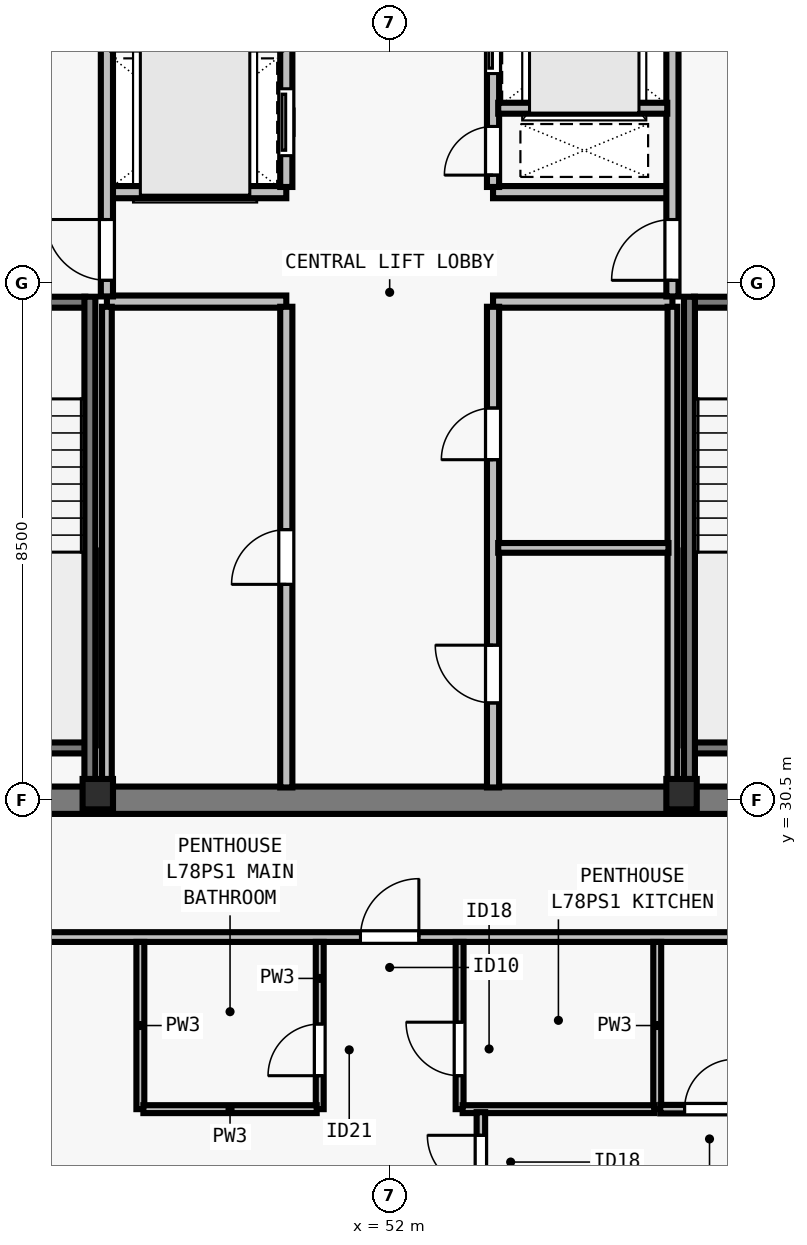
"""IFC4 building model, lengths in metres.
Left out: names, types, materials, properties, quantities, classifications, styles, units other than length and angle.
Written with IfcOpenShell. Run it as: python <this file> out.ifc"""

import sys

from ifc_helpers import new_model, si_unit, direction, frame, frame_2d, origin, origin_2d, place, context, subcontext, project, spatial, rectangle, i_section, extrude, element, fill, save


model = new_model("IFC4")
c1 = context("Model", 3, precision=1e-05, world=origin(), true_north=direction((0.0, 1.0)))
c2 = subcontext(c1, "Body", "Model", "MODEL_VIEW")
j1 = project(units=[si_unit("LENGTHUNIT", "METRE"), si_unit("PLANEANGLEUNIT", "RADIAN")], contexts=[c1])
p1 = place(None, origin())
s1 = spatial("IfcSite", under=j1, at=p1, CompositionType="ELEMENT")
p2 = place(p1, origin())
s2 = spatial("IfcBuilding", under=s1, at=p2, CompositionType="ELEMENT")
p3 = place(p2, frame((0.0, 0.0, 284.0)))
s3 = spatial("IfcBuildingStorey", under=s2, at=p3, CompositionType="ELEMENT", Elevation=284.0)
for number, where, z_axis, x_axis in (
    (1, (47.2, 30.6, 0.0), (0.0, 0.0, 1.0), (1.0, 0.0, 0.0)),
    (2, (56.8, 30.6, 0.0), (0.0, 0.0, 1.0), (1.0, 0.0, 0.0)),
):
    element("IfcColumn", number, at=place(p3, frame(where, z_axis=z_axis, x_axis=x_axis)), inside=s3, PredefinedType="COLUMN", context=c2, shape_type="SweptSolid", body=[
        extrude(i_section(OverallWidth=0.5, OverallDepth=0.5, WebThickness=0.028, FlangeThickness=0.045, at=origin_2d()), origin(), (0.0, 0.0, 1.0), 3.5),
    ])
p4 = place(p3, frame((43.275, 30.5, 0.0), z_axis=(0.0, 0.0, 1.0), x_axis=(1.0, 0.0, 0.0)))
e3 = element("IfcWall", 3, at=p4, inside=s3, PredefinedType="SHEAR", context=c2, shape_type="SweptSolid", body=[
    extrude(rectangle(XDim=17.45, YDim=0.45, at=frame_2d((8.725, 0.0))), origin(), (0.0, 0.0, 1.0), 3.29),
])
for number, where, z_axis, x_axis in (
    (4, (47.35, 38.7, 0.0), (0.0, 0.0, 1.0), (1.0, 0.0, 0.0)),
    (5, (47.35, 40.5, 0.0), (0.0, 0.0, 1.0), (1.0, 0.0, 0.0)),
    (6, (53.7, 38.7, 0.0), (0.0, 0.0, 1.0), (1.0, 0.0, 0.0)),
    (7, (53.7, 40.5, 0.0), (0.0, 0.0, 1.0), (1.0, 0.0, 0.0)),
):
    element("IfcWall", number, at=place(p3, frame(where, z_axis=z_axis, x_axis=x_axis)), inside=s3, PredefinedType="SOLIDWALL", context=c2, shape_type="SweptSolid", body=[
        extrude(rectangle(XDim=2.95, YDim=0.2, at=frame_2d((1.475, 0.0))), origin(), (0.0, 0.0, 1.0), 3.29),
    ])
p5 = place(p3, frame((50.3, 30.71, 0.0), z_axis=(0.0, 0.0, 1.0), x_axis=(0.0, 1.0, 0.0)))
e8 = element("IfcWall", 8, at=p5, inside=s3, PredefinedType="SOLIDWALL", context=c2, shape_type="SweptSolid", body=[
    extrude(rectangle(XDim=7.905, YDim=0.2, at=frame_2d((3.953, 0.0))), origin(), (0.0, 0.0, 1.0), 3.29),
])
p6 = place(p5, frame((3.34, 0.0, 0.0)))
e9 = element("IfcOpeningElement", 9, at=p6, cuts=e8, PredefinedType="OPENING", context=c2, shape_type="SweptSolid", body=[
    extrude(rectangle(XDim=0.9, YDim=2.12, at=frame_2d((0.45, 1.06))), frame((0.0, 0.11, 0.0), z_axis=(0.0, -1.0, 0.0), x_axis=(1.0, 0.0, 0.0)), (0.0, 0.0, 1.0), 0.22),
])
p7 = place(p3, frame((53.7, 30.71, 0.0), z_axis=(0.0, 0.0, 1.0), x_axis=(0.0, 1.0, 0.0)))
e10 = element("IfcWall", 10, at=p7, inside=s3, PredefinedType="SOLIDWALL", context=c2, shape_type="SweptSolid", body=[
    extrude(rectangle(XDim=7.905, YDim=0.2, at=frame_2d((3.953, 0.0))), origin(), (0.0, 0.0, 1.0), 3.29),
])
p8 = place(p7, frame((1.39, 0.0, 0.0)))
e11 = element("IfcOpeningElement", 11, at=p8, cuts=e10, PredefinedType="OPENING", context=c2, shape_type="SweptSolid", body=[
    extrude(rectangle(XDim=0.95, YDim=2.12, at=frame_2d((0.475, 1.06))), frame((0.0, 0.11, 0.0), z_axis=(0.0, -1.0, 0.0), x_axis=(1.0, 0.0, 0.0)), (0.0, 0.0, 1.0), 0.22),
])
p9 = place(p7, frame((5.39, 0.0, 0.0)))
e12 = element("IfcOpeningElement", 12, at=p9, cuts=e10, PredefinedType="OPENING", context=c2, shape_type="SweptSolid", body=[
    extrude(rectangle(XDim=0.85, YDim=2.12, at=frame_2d((0.425, 1.06))), frame((0.0, 0.11, 0.0), z_axis=(0.0, -1.0, 0.0), x_axis=(1.0, 0.0, 0.0)), (0.0, 0.0, 1.0), 0.22),
])
p10 = place(p3, frame((50.3, 40.585, 0.0), z_axis=(0.0, 0.0, 1.0), x_axis=(0.0, 1.0, 0.0)))
e13 = element("IfcWall", 13, at=p10, inside=s3, PredefinedType="SOLIDWALL", context=c2, shape_type="SweptSolid", body=[
    extrude(rectangle(XDim=6.705, YDim=0.2, at=frame_2d((3.353, 0.0))), origin(), (0.0, 0.0, 1.0), 3.29),
])
p11 = place(p10, frame((0.515, 0.0, 0.0)))
e14 = element("IfcOpeningElement", 14, at=p11, cuts=e13, PredefinedType="OPENING", context=c2, shape_type="SweptSolid", body=[
    extrude(rectangle(XDim=1.1, YDim=2.2, at=frame_2d((0.55, 1.1))), frame((0.0, 0.11, 0.0), z_axis=(0.0, -1.0, 0.0), x_axis=(1.0, 0.0, 0.0)), (0.0, 0.0, 1.0), 0.22),
])
p12 = place(p10, frame((3.015, 0.0, 0.0)))
e15 = element("IfcOpeningElement", 15, at=p12, cuts=e13, PredefinedType="OPENING", context=c2, shape_type="SweptSolid", body=[
    extrude(rectangle(XDim=1.1, YDim=2.2, at=frame_2d((0.55, 1.1))), frame((0.0, 0.11, 0.0), z_axis=(0.0, -1.0, 0.0), x_axis=(1.0, 0.0, 0.0)), (0.0, 0.0, 1.0), 0.22),
])
p13 = place(p10, frame((5.065, 0.0, 0.0)))
e16 = element("IfcOpeningElement", 16, at=p13, cuts=e13, PredefinedType="OPENING", context=c2, shape_type="SweptSolid", body=[
    extrude(rectangle(XDim=0.8, YDim=2.08, at=frame_2d((0.4, 1.04))), frame((0.0, 0.11, 0.0), z_axis=(0.0, -1.0, 0.0), x_axis=(1.0, 0.0, 0.0)), (0.0, 0.0, 1.0), 0.22),
])
p14 = place(p3, frame((53.7, 40.585, 0.0), z_axis=(0.0, 0.0, 1.0), x_axis=(0.0, 1.0, 0.0)))
e17 = element("IfcWall", 17, at=p14, inside=s3, PredefinedType="SOLIDWALL", context=c2, shape_type="SweptSolid", body=[
    extrude(rectangle(XDim=6.705, YDim=0.2, at=frame_2d((3.353, 0.0))), origin(), (0.0, 0.0, 1.0), 3.29),
])
p15 = place(p14, frame((0.195, 0.0, 0.0)))
e18 = element("IfcOpeningElement", 18, at=p15, cuts=e17, PredefinedType="OPENING", context=c2, shape_type="SweptSolid", body=[
    extrude(rectangle(XDim=0.8, YDim=2.08, at=frame_2d((0.4, 1.04))), frame((0.0, 0.11, 0.0), z_axis=(0.0, -1.0, 0.0), x_axis=(1.0, 0.0, 0.0)), (0.0, 0.0, 1.0), 0.22),
])
p16 = place(p14, frame((1.865, 0.0, 0.0)))
e19 = element("IfcOpeningElement", 19, at=p16, cuts=e17, PredefinedType="OPENING", context=c2, shape_type="SweptSolid", body=[
    extrude(rectangle(XDim=1.1, YDim=2.2, at=frame_2d((0.55, 1.1))), frame((0.0, 0.11, 0.0), z_axis=(0.0, -1.0, 0.0), x_axis=(1.0, 0.0, 0.0)), (0.0, 0.0, 1.0), 0.22),
])
p17 = place(p14, frame((4.265, 0.0, 0.0)))
e20 = element("IfcOpeningElement", 20, at=p17, cuts=e17, PredefinedType="OPENING", context=c2, shape_type="SweptSolid", body=[
    extrude(rectangle(XDim=0.95, YDim=2.12, at=frame_2d((0.475, 1.06))), frame((0.0, 0.11, 0.0), z_axis=(0.0, -1.0, 0.0), x_axis=(1.0, 0.0, 0.0)), (0.0, 0.0, 1.0), 0.22),
])
p18 = place(p3, frame((47.35, 38.785, 0.0), z_axis=(0.0, 0.0, 1.0), x_axis=(0.0, 1.0, 0.0)))
e21 = element("IfcWall", 21, at=p18, inside=s3, PredefinedType="SOLIDWALL", context=c2, shape_type="SweptSolid", body=[
    extrude(rectangle(XDim=4.865, YDim=0.2, at=frame_2d((2.433, 0.0))), origin(), (0.0, 0.0, 1.0), 3.29),
])
p19 = place(p18, frame((0.265, 0.0, 0.0)))
e22 = element("IfcOpeningElement", 22, at=p19, cuts=e21, PredefinedType="OPENING", context=c2, shape_type="SweptSolid", body=[
    extrude(rectangle(XDim=1.0, YDim=2.15, at=frame_2d((0.5, 1.075))), frame((0.0, 0.11, 0.0), z_axis=(0.0, -1.0, 0.0), x_axis=(1.0, 0.0, 0.0)), (0.0, 0.0, 1.0), 0.22),
])
p20 = place(p3, frame((56.65, 38.785, 0.0), z_axis=(0.0, 0.0, 1.0), x_axis=(0.0, 1.0, 0.0)))
e23 = element("IfcWall", 23, at=p20, inside=s3, PredefinedType="SOLIDWALL", context=c2, shape_type="SweptSolid", body=[
    extrude(rectangle(XDim=4.865, YDim=0.2, at=frame_2d((2.433, 0.0))), origin(), (0.0, 0.0, 1.0), 3.29),
])
p21 = place(p20, frame((0.265, 0.0, 0.0)))
e24 = element("IfcOpeningElement", 24, at=p21, cuts=e23, PredefinedType="OPENING", context=c2, shape_type="SweptSolid", body=[
    extrude(rectangle(XDim=1.0, YDim=2.15, at=frame_2d((0.5, 1.075))), frame((0.0, 0.11, 0.0), z_axis=(0.0, -1.0, 0.0), x_axis=(1.0, 0.0, 0.0)), (0.0, 0.0, 1.0), 0.22),
])
for number, where, z_axis, x_axis in (
    (25, (47.35, 30.71, 0.0), (0.0, 0.0, 1.0), (0.0, 1.0, 0.0)),
    (26, (56.65, 30.71, 0.0), (0.0, 0.0, 1.0), (0.0, 1.0, 0.0)),
):
    element("IfcWall", number, at=place(p3, frame(where, z_axis=z_axis, x_axis=x_axis)), inside=s3, PredefinedType="PARTITIONING", context=c2, shape_type="SweptSolid", body=[
        extrude(rectangle(XDim=7.905, YDim=0.16, at=frame_2d((3.953, 0.0))), origin(), (0.0, 0.0, 1.0), 3.29),
    ])
p22 = place(p3, frame((53.785, 34.65, 0.0), z_axis=(0.0, 0.0, 1.0), x_axis=(1.0, 0.0, 0.0)))
e27 = element("IfcWall", 27, at=p22, inside=s3, PredefinedType="PARTITIONING", context=c2, shape_type="SweptSolid", body=[
    extrude(rectangle(XDim=2.8, YDim=0.16, at=frame_2d((1.4, 0.0))), origin(), (0.0, 0.0, 1.0), 3.29),
])
p23 = place(p3, frame((53.785, 41.88, 0.0), z_axis=(0.0, 0.0, 1.0), x_axis=(1.0, 0.0, 0.0)))
e28 = element("IfcWall", 28, at=p23, inside=s3, PredefinedType="SOLIDWALL", context=c2, shape_type="SweptSolid", body=[
    extrude(rectangle(XDim=2.78, YDim=0.18, at=frame_2d((1.39, 0.0))), origin(), (0.0, 0.0, 1.0), 3.29),
])
p24 = place(p3, frame((31.285, 28.25, 0.0), z_axis=(0.0, 0.0, 1.0), x_axis=(1.0, 0.0, 0.0)))
e29 = element("IfcWall", 29, at=p24, inside=s3, PredefinedType="PARTITIONING", context=c2, shape_type="SweptSolid", body=[
    extrude(rectangle(XDim=41.43, YDim=0.16, at=frame_2d((20.715, 0.0))), origin(), (0.0, 0.0, 1.0), 3.009),
])
p25 = place(p24, frame((20.235, 0.0, 0.0)))
e30 = element("IfcOpeningElement", 30, at=p25, cuts=e29, PredefinedType="OPENING", context=c2, shape_type="SweptSolid", body=[
    extrude(rectangle(XDim=0.96, YDim=2.18, at=frame_2d((0.48, 1.09))), frame((0.0, 0.09, 0.0), z_axis=(0.0, -1.0, 0.0), x_axis=(1.0, 0.0, 0.0)), (0.0, 0.0, 1.0), 0.18),
])
p26 = place(p3, frame((47.9, 25.42, 0.0), z_axis=(0.0, 0.0, 1.0), x_axis=(0.0, 1.0, 0.0)))
e31 = element("IfcWall", 31, at=p26, inside=s3, PredefinedType="PLUMBINGWALL", context=c2, shape_type="SweptSolid", body=[
    extrude(rectangle(XDim=2.75, YDim=0.13, at=frame_2d((1.375, 0.0))), origin(), (0.0, 0.0, 1.0), 3.29),
])
p27 = place(p3, frame((50.85, 25.42, 0.0), z_axis=(0.0, 0.0, 1.0), x_axis=(0.0, 1.0, 0.0)))
e32 = element("IfcWall", 32, at=p27, inside=s3, PredefinedType="PLUMBINGWALL", context=c2, shape_type="SweptSolid", body=[
    extrude(rectangle(XDim=2.75, YDim=0.13, at=frame_2d((1.375, 0.0))), origin(), (0.0, 0.0, 1.0), 3.29),
])
p28 = place(p27, frame((0.55, 0.0, 0.0)))
e33 = element("IfcOpeningElement", 33, at=p28, cuts=e32, PredefinedType="OPENING", context=c2, shape_type="SweptSolid", body=[
    extrude(rectangle(XDim=0.85, YDim=2.08, at=frame_2d((0.425, 1.04))), frame((0.0, 0.075, 0.0), z_axis=(0.0, -1.0, 0.0), x_axis=(1.0, 0.0, 0.0)), (0.0, 0.0, 1.0), 0.15),
])
p29 = place(p3, frame((47.95, 25.42, 0.0), z_axis=(0.0, 0.0, 1.0), x_axis=(1.0, 0.0, 0.0)))
e34 = element("IfcWall", 34, at=p29, inside=s3, PredefinedType="PLUMBINGWALL", context=c2, shape_type="SweptSolid", body=[
    extrude(rectangle(XDim=2.85, YDim=0.13, at=frame_2d((1.425, 0.0))), origin(), (0.0, 0.0, 1.0), 3.29),
])
p30 = place(p3, frame((56.4, 25.42, 0.0), z_axis=(0.0, 0.0, 1.0), x_axis=(0.0, 1.0, 0.0)))
e35 = element("IfcWall", 35, at=p30, inside=s3, PredefinedType="PLUMBINGWALL", context=c2, shape_type="SweptSolid", body=[
    extrude(rectangle(XDim=2.75, YDim=0.13, at=frame_2d((1.375, 0.0))), origin(), (0.0, 0.0, 1.0), 3.29),
])
p31 = place(p3, frame((53.15, 25.42, 0.0), z_axis=(0.0, 0.0, 1.0), x_axis=(0.0, 1.0, 0.0)))
e36 = element("IfcWall", 36, at=p31, inside=s3, PredefinedType="PLUMBINGWALL", context=c2, shape_type="SweptSolid", body=[
    extrude(rectangle(XDim=2.75, YDim=0.13, at=frame_2d((1.375, 0.0))), origin(), (0.0, 0.0, 1.0), 3.009),
])
p32 = place(p31, frame((0.55, 0.0, 0.0)))
e37 = element("IfcOpeningElement", 37, at=p32, cuts=e36, PredefinedType="OPENING", context=c2, shape_type="SweptSolid", body=[
    extrude(rectangle(XDim=0.88, YDim=2.1, at=frame_2d((0.44, 1.05))), frame((0.0, 0.075, 0.0), z_axis=(0.0, -1.0, 0.0), x_axis=(1.0, 0.0, 0.0)), (0.0, 0.0, 1.0), 0.15),
])
p33 = place(p3, frame((53.2, 25.42, 0.0), z_axis=(0.0, 0.0, 1.0), x_axis=(1.0, 0.0, 0.0)))
e38 = element("IfcWall", 38, at=p33, inside=s3, PredefinedType="PLUMBINGWALL", context=c2, shape_type="SweptSolid", body=[
    extrude(rectangle(XDim=3.15, YDim=0.13, at=frame_2d((1.575, 0.0))), origin(), (0.0, 0.0, 1.0), 3.29),
])
p34 = place(p3, frame((56.45, 25.42, 0.0), z_axis=(0.0, 0.0, 1.0), x_axis=(1.0, 0.0, 0.0)))
e39 = element("IfcWall", 39, at=p34, inside=s3, PredefinedType="PARTITIONING", context=c2, shape_type="SweptSolid", body=[
    extrude(rectangle(XDim=16.18, YDim=0.14, at=frame_2d((8.09, 0.0))), origin(), (0.0, 0.0, 1.0), 3.009),
])
p35 = place(p34, frame((0.4, 0.0, 0.0)))
e40 = element("IfcOpeningElement", 40, at=p35, cuts=e39, PredefinedType="OPENING", context=c2, shape_type="SweptSolid", body=[
    extrude(rectangle(XDim=0.82, YDim=2.1, at=frame_2d((0.41, 1.05))), frame((0.0, 0.08, 0.0), z_axis=(0.0, -1.0, 0.0), x_axis=(1.0, 0.0, 0.0)), (0.0, 0.0, 1.0), 0.16),
])
p36 = place(p3, frame((53.5, 18.38, 0.0), z_axis=(0.0, 0.0, 1.0), x_axis=(0.0, 1.0, 0.0)))
e41 = element("IfcWall", 41, at=p36, inside=s3, PredefinedType="PARTITIONING", context=c2, shape_type="SweptSolid", body=[
    extrude(rectangle(XDim=6.99, YDim=0.14, at=frame_2d((3.495, 0.0))), origin(), (0.0, 0.0, 1.0), 3.29),
])
p37 = place(p36, frame((5.73, 0.0, 0.0)))
e42 = element("IfcOpeningElement", 42, at=p37, cuts=e41, PredefinedType="OPENING", context=c2, shape_type="SweptSolid", body=[
    extrude(rectangle(XDim=0.88, YDim=2.1, at=frame_2d((0.44, 1.05))), frame((0.0, 0.08, 0.0), z_axis=(0.0, -1.0, 0.0), x_axis=(1.0, 0.0, 0.0)), (0.0, 0.0, 1.0), 0.16),
])
p38 = place(p3, frame((43.715, 38.69, 0.0), z_axis=(0.0, 0.0, 1.0), x_axis=(1.0, 0.0, 0.0)))
e43 = element("IfcWall", 43, at=p38, inside=s3, PredefinedType="SOLIDWALL", context=c2, shape_type="SweptSolid", body=[
    extrude(rectangle(XDim=3.28, YDim=0.18, at=frame_2d((1.64, 0.0))), origin(), (0.0, 0.0, 1.0), 3.29),
])
p39 = place(p38, frame((1.165, 0.0, 0.0)))
e44 = element("IfcOpeningElement", 44, at=p39, cuts=e43, PredefinedType="OPENING", context=c2, shape_type="SweptSolid", body=[
    extrude(rectangle(XDim=0.95, YDim=2.15, at=frame_2d((0.475, 1.075))), frame((0.0, 0.1, 0.0), z_axis=(0.0, -1.0, 0.0), x_axis=(1.0, 0.0, 0.0)), (0.0, 0.0, 1.0), 0.2),
])
p40 = place(p3, frame((43.715, 31.36, 0.0), z_axis=(0.0, 0.0, 1.0), x_axis=(1.0, 0.0, 0.0)))
e45 = element("IfcWall", 45, at=p40, inside=s3, PredefinedType="SOLIDWALL", context=c2, shape_type="SweptSolid", body=[
    extrude(rectangle(XDim=3.28, YDim=0.18, at=frame_2d((1.64, 0.0))), origin(), (0.0, 0.0, 1.0), 3.29),
])
p41 = place(p3, frame((47.07, 38.78, 0.0), z_axis=(0.0, 0.0, 1.0), x_axis=(0.0, -1.0, 0.0)))
e46 = element("IfcWall", 46, at=p41, inside=s3, PredefinedType="SOLIDWALL", context=c2, shape_type="SweptSolid", body=[
    extrude(rectangle(XDim=8.067, YDim=0.18, at=frame_2d((4.034, 0.0))), origin(), (0.0, 0.0, 1.0), 3.29),
])
p42 = place(p3, frame((57.005, 38.69, 0.0), z_axis=(0.0, 0.0, 1.0), x_axis=(1.0, 0.0, 0.0)))
e47 = element("IfcWall", 47, at=p42, inside=s3, PredefinedType="SOLIDWALL", context=c2, shape_type="SweptSolid", body=[
    extrude(rectangle(XDim=3.28, YDim=0.18, at=frame_2d((1.64, 0.0))), origin(), (0.0, 0.0, 1.0), 3.29),
])
p43 = place(p42, frame((1.165, 0.0, 0.0)))
e48 = element("IfcOpeningElement", 48, at=p43, cuts=e47, PredefinedType="OPENING", context=c2, shape_type="SweptSolid", body=[
    extrude(rectangle(XDim=0.95, YDim=2.15, at=frame_2d((0.475, 1.075))), frame((0.0, 0.1, 0.0), z_axis=(0.0, -1.0, 0.0), x_axis=(1.0, 0.0, 0.0)), (0.0, 0.0, 1.0), 0.2),
])
p44 = place(p3, frame((57.005, 31.36, 0.0), z_axis=(0.0, 0.0, 1.0), x_axis=(1.0, 0.0, 0.0)))
e49 = element("IfcWall", 49, at=p44, inside=s3, PredefinedType="SOLIDWALL", context=c2, shape_type="SweptSolid", body=[
    extrude(rectangle(XDim=3.28, YDim=0.18, at=frame_2d((1.64, 0.0))), origin(), (0.0, 0.0, 1.0), 3.29),
])
p45 = place(p3, frame((56.93, 38.78, 0.0), z_axis=(0.0, 0.0, 1.0), x_axis=(0.0, -1.0, 0.0)))
e50 = element("IfcWall", 50, at=p45, inside=s3, PredefinedType="SOLIDWALL", context=c2, shape_type="SweptSolid", body=[
    extrude(rectangle(XDim=8.067, YDim=0.18, at=frame_2d((4.034, 0.0))), origin(), (0.0, 0.0, 1.0), 3.29),
])
p46 = place(p19, origin())
e51 = element("IfcDoor", 51, at=p46, inside=s3, OperationType="SINGLE_SWING_RIGHT", PredefinedType="DOOR", context=c2, shape_type="SweptSolid", body=[
    extrude(rectangle(XDim=1.0, YDim=2.15, at=frame_2d((0.5, 1.075))), frame((0.0, 0.025, 0.0), z_axis=(0.0, -1.0, 0.0), x_axis=(1.0, 0.0, 0.0)), (0.0, 0.0, 1.0), 0.05),
])
fill(e22, e51)
p47 = place(p21, origin())
e52 = element("IfcDoor", 52, at=p47, inside=s3, OperationType="SINGLE_SWING_LEFT", PredefinedType="DOOR", context=c2, shape_type="SweptSolid", body=[
    extrude(rectangle(XDim=1.0, YDim=2.15, at=frame_2d((0.5, 1.075))), frame((0.0, 0.025, 0.0), z_axis=(0.0, -1.0, 0.0), x_axis=(1.0, 0.0, 0.0)), (0.0, 0.0, 1.0), 0.05),
])
fill(e24, e52)
p48 = place(p6, origin())
e53 = element("IfcDoor", 53, at=p48, inside=s3, OperationType="SINGLE_SWING_LEFT", PredefinedType="DOOR", context=c2, shape_type="SweptSolid", body=[
    extrude(rectangle(XDim=0.9, YDim=2.12, at=frame_2d((0.45, 1.06))), frame((0.0, 0.025, 0.0), z_axis=(0.0, -1.0, 0.0), x_axis=(1.0, 0.0, 0.0)), (0.0, 0.0, 1.0), 0.05),
])
fill(e9, e53)
p49 = place(p8, origin())
e54 = element("IfcDoor", 54, at=p49, inside=s3, OperationType="SINGLE_SWING_RIGHT", PredefinedType="DOOR", context=c2, shape_type="SweptSolid", body=[
    extrude(rectangle(XDim=0.95, YDim=2.12, at=frame_2d((0.475, 1.06))), frame((0.0, 0.025, 0.0), z_axis=(0.0, -1.0, 0.0), x_axis=(1.0, 0.0, 0.0)), (0.0, 0.0, 1.0), 0.05),
])
fill(e11, e54)
p50 = place(p9, origin())
e55 = element("IfcDoor", 55, at=p50, inside=s3, OperationType="SINGLE_SWING_LEFT", PredefinedType="DOOR", context=c2, shape_type="SweptSolid", body=[
    extrude(rectangle(XDim=0.85, YDim=2.12, at=frame_2d((0.425, 1.06))), frame((0.0, 0.025, 0.0), z_axis=(0.0, -1.0, 0.0), x_axis=(1.0, 0.0, 0.0)), (0.0, 0.0, 1.0), 0.05),
])
fill(e12, e55)
p51 = place(p11, origin())
e56 = element("IfcDoor", 56, at=p51, inside=s3, OperationType="SLIDING_TO_LEFT", PredefinedType="DOOR", context=c2, shape_type="SweptSolid", body=[
    extrude(rectangle(XDim=1.1, YDim=2.2, at=frame_2d((0.55, 1.1))), frame((0.0, 0.025, 0.0), z_axis=(0.0, -1.0, 0.0), x_axis=(1.0, 0.0, 0.0)), (0.0, 0.0, 1.0), 0.05),
])
fill(e14, e56)
p52 = place(p15, origin())
e57 = element("IfcDoor", 57, at=p52, inside=s3, OperationType="SINGLE_SWING_LEFT", PredefinedType="DOOR", context=c2, shape_type="SweptSolid", body=[
    extrude(rectangle(XDim=0.8, YDim=2.08, at=frame_2d((0.4, 1.04))), frame((0.0, 0.025, 0.0), z_axis=(0.0, -1.0, 0.0), x_axis=(1.0, 0.0, 0.0)), (0.0, 0.0, 1.0), 0.05),
])
fill(e18, e57)
p53 = place(p16, origin())
e58 = element("IfcDoor", 58, at=p53, inside=s3, OperationType="SLIDING_TO_LEFT", PredefinedType="DOOR", context=c2, shape_type="SweptSolid", body=[
    extrude(rectangle(XDim=1.1, YDim=2.2, at=frame_2d((0.55, 1.1))), frame((0.0, 0.025, 0.0), z_axis=(0.0, -1.0, 0.0), x_axis=(1.0, 0.0, 0.0)), (0.0, 0.0, 1.0), 0.05),
])
fill(e19, e58)
p54 = place(p28, origin())
e59 = element("IfcDoor", 59, at=p54, inside=s3, OperationType="SINGLE_SWING_LEFT", PredefinedType="DOOR", context=c2, shape_type="SweptSolid", body=[
    extrude(rectangle(XDim=0.85, YDim=2.08, at=frame_2d((0.425, 1.04))), frame((0.0, 0.025, 0.0), z_axis=(0.0, -1.0, 0.0), x_axis=(1.0, 0.0, 0.0)), (0.0, 0.0, 1.0), 0.05),
])
fill(e33, e59)
p55 = place(p32, origin())
e60 = element("IfcDoor", 60, at=p55, inside=s3, OperationType="SINGLE_SWING_RIGHT", PredefinedType="DOOR", context=c2, shape_type="SweptSolid", body=[
    extrude(rectangle(XDim=0.88, YDim=2.1, at=frame_2d((0.44, 1.05))), frame((0.0, 0.025, 0.0), z_axis=(0.0, -1.0, 0.0), x_axis=(1.0, 0.0, 0.0)), (0.0, 0.0, 1.0), 0.05),
])
fill(e37, e60)
p56 = place(p35, origin())
e61 = element("IfcDoor", 61, at=p56, inside=s3, OperationType="SINGLE_SWING_RIGHT", PredefinedType="DOOR", context=c2, shape_type="SweptSolid", body=[
    extrude(rectangle(XDim=0.82, YDim=2.1, at=frame_2d((0.41, 1.05))), frame((0.0, 0.025, 0.0), z_axis=(0.0, -1.0, 0.0), x_axis=(1.0, 0.0, 0.0)), (0.0, 0.0, 1.0), 0.05),
])
fill(e40, e61)
p57 = place(p37, origin())
e62 = element("IfcDoor", 62, at=p57, inside=s3, OperationType="SINGLE_SWING_RIGHT", PredefinedType="DOOR", context=c2, shape_type="SweptSolid", body=[
    extrude(rectangle(XDim=0.88, YDim=2.1, at=frame_2d((0.44, 1.05))), frame((0.0, 0.025, 0.0), z_axis=(0.0, -1.0, 0.0), x_axis=(1.0, 0.0, 0.0)), (0.0, 0.0, 1.0), 0.05),
])
fill(e42, e62)
p58 = place(p25, origin())
e63 = element("IfcDoor", 63, at=p58, inside=s3, OperationType="SINGLE_SWING_RIGHT", PredefinedType="DOOR", context=c2, shape_type="SweptSolid", body=[
    extrude(rectangle(XDim=0.96, YDim=2.18, at=frame_2d((0.48, 1.09))), frame((0.0, 0.025, 0.0), z_axis=(0.0, -1.0, 0.0), x_axis=(1.0, 0.0, 0.0)), (0.0, 0.0, 1.0), 0.05),
])
fill(e30, e63)
save(model, sys.argv[1])
